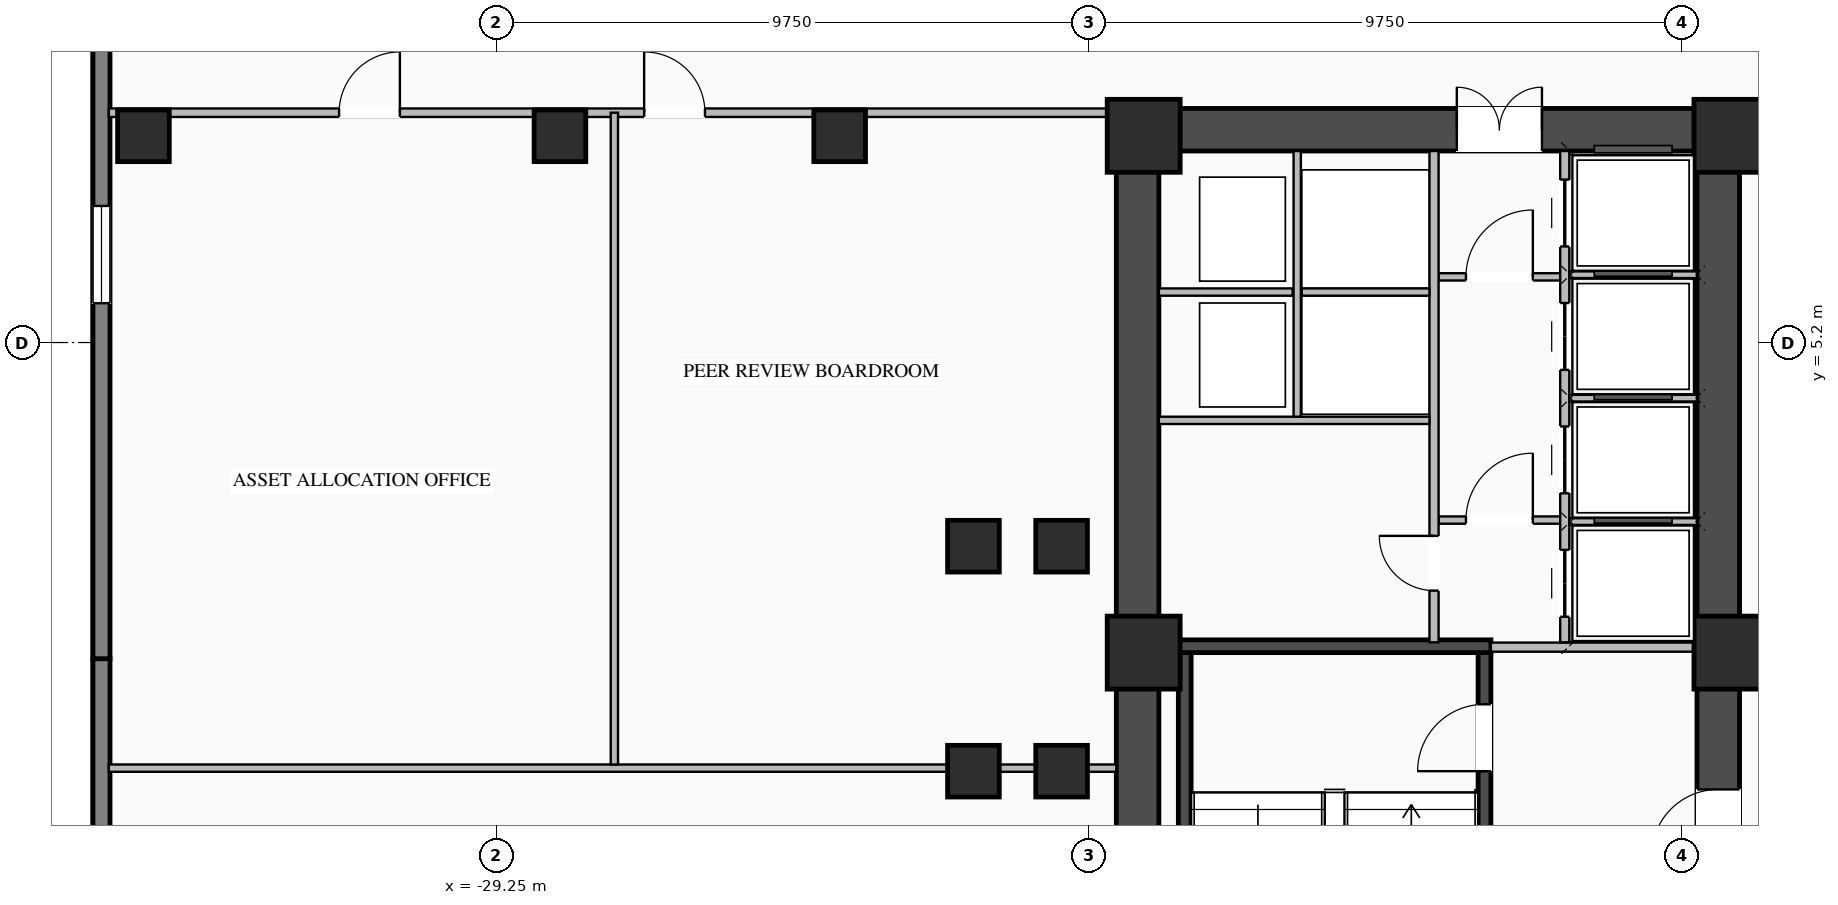
"""IFC4 building model, lengths in metres.
Left out: names, types, materials, properties, quantities, classifications, styles, units other than length and angle.
Written with IfcOpenShell. Run it as: python <this file> out.ifc"""

import sys

from ifc_helpers import new_model, si_unit, direction, frame, frame_2d, origin, origin_2d, place, context, subcontext, project, spatial, rectangle, i_section, extrude, element, fill, save


model = new_model("IFC4")
c1 = context("Model", 3, precision=1e-05, world=origin(), true_north=direction((0.0, 1.0)))
c2 = subcontext(c1, "Body", "Model", "MODEL_VIEW")
j1 = project(units=[si_unit("LENGTHUNIT", "METRE"), si_unit("PLANEANGLEUNIT", "RADIAN")], contexts=[c1])
p1 = place(None, origin())
s1 = spatial("IfcSite", under=j1, at=p1, CompositionType="ELEMENT")
p2 = place(p1, origin())
s2 = spatial("IfcBuilding", under=s1, at=p2, CompositionType="ELEMENT")
p3 = place(p2, frame((0.0, 0.0, 51.9)))
s3 = spatial("IfcBuildingStorey", under=s2, at=p3, CompositionType="ELEMENT", Elevation=51.9)
p4 = place(p3, frame((-19.05, 8.7, 0.0), z_axis=(0.0, 0.0, 1.0), x_axis=(1.0, 0.0, 0.0)))
e1 = element("IfcWall", 1, at=p4, inside=s3, PredefinedType="SHEAR", context=c2, shape_type="SweptSolid", body=[
    extrude(rectangle(XDim=10.25, YDim=0.7, at=frame_2d((5.125, 0.0))), origin(), (0.0, 0.0, 1.0), 3.27),
])
p5 = place(p4, frame((5.6, 0.0, 0.0)))
e2 = element("IfcOpeningElement", 2, at=p5, cuts=e1, PredefinedType="OPENING", context=c2, shape_type="SweptSolid", body=[
    extrude(rectangle(XDim=1.4, YDim=2.05, at=frame_2d((0.7, 1.025))), frame((0.0, 0.36, 0.0), z_axis=(0.0, -1.0, 0.0), x_axis=(1.0, 0.0, 0.0)), (0.0, 0.0, 1.0), 0.72),
])
p6 = place(p3, frame((-18.7, -8.35, 0.0), z_axis=(0.0, 0.0, 1.0), x_axis=(0.0, 1.0, 0.0)))
e3 = element("IfcWall", 3, at=p6, inside=s3, PredefinedType="SHEAR", context=c2, shape_type="SweptSolid", body=[
    extrude(rectangle(XDim=16.7, YDim=0.7, at=frame_2d((8.35, 0.0))), origin(), (0.0, 0.0, 1.0), 3.27),
])
p7 = place(p3, frame((-9.15, -8.35, 0.0), z_axis=(0.0, 0.0, 1.0), x_axis=(0.0, 1.0, 0.0)))
e4 = element("IfcWall", 4, at=p7, inside=s3, PredefinedType="SHEAR", context=c2, shape_type="SweptSolid", body=[
    extrude(rectangle(XDim=16.7, YDim=0.7, at=frame_2d((8.35, 0.0))), origin(), (0.0, 0.0, 1.0), 3.27),
])
p8 = place(p7, frame((5.1, 0.0, 0.0)))
e5 = element("IfcOpeningElement", 5, at=p8, cuts=e4, PredefinedType="OPENING", context=c2, shape_type="SweptSolid", body=[
    extrude(rectangle(XDim=1.1, YDim=2.08, at=frame_2d((0.55, 1.04))), frame((0.0, 0.36, 0.0), z_axis=(0.0, -1.0, 0.0), x_axis=(1.0, 0.0, 0.0)), (0.0, 0.0, 1.0), 0.72),
])
p9 = place(p3, frame((-12.995, -8.1, 0.0), z_axis=(0.0, 0.0, 1.0), x_axis=(0.0, 1.0, 0.0)))
e6 = element("IfcWall", 6, at=p9, inside=s3, PredefinedType="SHEAR", context=c2, shape_type="SweptSolid", body=[
    extrude(rectangle(XDim=8.2, YDim=0.21, at=frame_2d((4.1, 0.0))), origin(), (0.0, 0.0, 1.0), 3.27),
])
p10 = place(p9, frame((6.25, 0.0, 0.0)))
e7 = element("IfcOpeningElement", 7, at=p10, cuts=e6, PredefinedType="OPENING", context=c2, shape_type="SweptSolid", body=[
    extrude(rectangle(XDim=1.1, YDim=2.15, at=frame_2d((0.55, 1.075))), frame((0.0, 0.115, 0.0), z_axis=(0.0, -1.0, 0.0), x_axis=(1.0, 0.0, 0.0)), (0.0, 0.0, 1.0), 0.23),
])
p11 = place(p3, frame((-17.925, -8.1, 0.0), z_axis=(0.0, 0.0, 1.0), x_axis=(0.0, 1.0, 0.0)))
e8 = element("IfcWall", 8, at=p11, inside=s3, PredefinedType="SHEAR", context=c2, shape_type="SweptSolid", body=[
    extrude(rectangle(XDim=8.2, YDim=0.21, at=frame_2d((4.1, 0.0))), origin(), (0.0, 0.0, 1.0), 3.27),
])
p12 = place(p3, frame((-12.89, 0.205, 0.0), z_axis=(0.0, 0.0, 1.0), x_axis=(-1.0, 0.0, 0.0)))
e9 = element("IfcWall", 9, at=p12, inside=s3, PredefinedType="SHEAR", context=c2, shape_type="SweptSolid", body=[
    extrude(rectangle(XDim=5.14, YDim=0.21, at=frame_2d((2.57, 0.0))), origin(), (0.0, 0.0, 1.0), 3.27),
])
for number, where, z_axis, x_axis in (
    (10, (-8.95, 0.1, 0.0), (0.0, 0.0, 1.0), (1.0, 0.0, 0.0)),
    (11, (-8.95, 8.6, 0.0), (0.0, 0.0, 1.0), (1.0, 0.0, 0.0)),
    (12, (-18.6, 0.1, 0.0), (0.0, 0.0, 1.0), (1.0, 0.0, 0.0)),
    (13, (-18.6, 8.6, 0.0), (0.0, 0.0, 1.0), (1.0, 0.0, 0.0)),
):
    element("IfcColumn", number, at=place(p3, frame(where, z_axis=z_axis, x_axis=x_axis)), inside=s3, PredefinedType="COLUMN", context=c2, shape_type="SweptSolid", body=[
        extrude(rectangle(XDim=1.2, YDim=1.2, at=origin_2d()), origin(), (0.0, 0.0, 1.0), 3.45),
    ])
for number, where, z_axis, x_axis in (
    (14, (-21.4, -1.85, 0.0), (0.0, 0.0, 1.0), (1.0, 0.0, 0.0)),
    (15, (-21.4, 1.85, 0.0), (0.0, 0.0, 1.0), (1.0, 0.0, 0.0)),
    (16, (-19.95, -1.85, 0.0), (0.0, 0.0, 1.0), (1.0, 0.0, 0.0)),
    (17, (-19.95, 1.85, 0.0), (0.0, 0.0, 1.0), (1.0, 0.0, 0.0)),
    (18, (-23.6, 8.6, 0.0), (0.0, 0.0, 1.0), (1.0, 0.0, 0.0)),
    (19, (-28.2, 8.6, 0.0), (0.0, 0.0, 1.0), (1.0, 0.0, 0.0)),
    (20, (-35.05, 8.6, 0.0), (0.0, 0.0, 1.0), (1.0, 0.0, 0.0)),
):
    element("IfcColumn", number, at=place(p3, frame(where, z_axis=z_axis, x_axis=x_axis)), inside=s3, PredefinedType="COLUMN", context=c2, shape_type="SweptSolid", body=[
        extrude(i_section(OverallWidth=0.85, OverallDepth=0.85, WebThickness=0.032, FlangeThickness=0.048, at=origin_2d()), origin(), (0.0, 0.0, 1.0), 3.45),
    ])
p13 = place(p3, frame((-35.74, -19.94, 0.0), z_axis=(0.0, 0.0, 1.0), x_axis=(0.0, 1.0, 0.0)))
e21 = element("IfcWall", 21, at=p13, inside=s3, PredefinedType="STANDARD", context=c2, shape_type="SweptSolid", body=[
    extrude(rectangle(XDim=19.94, YDim=0.28, at=frame_2d((9.97, 0.0))), origin(), (0.0, 0.0, 1.0), 3.25),
])
p14 = place(p13, frame((6.397, 0.0, 0.76)))
e22 = element("IfcOpeningElement", 22, at=p14, cuts=e21, PredefinedType="OPENING", context=c2, shape_type="SweptSolid", body=[
    extrude(rectangle(XDim=1.6, YDim=1.95, at=frame_2d((0.8, 0.975))), frame((0.0, 0.15, 0.0), z_axis=(0.0, -1.0, 0.0), x_axis=(1.0, 0.0, 0.0)), (0.0, 0.0, 1.0), 0.3),
])
p15 = place(p13, frame((12.493, 0.0, 0.76)))
e23 = element("IfcOpeningElement", 23, at=p15, cuts=e21, PredefinedType="OPENING", context=c2, shape_type="SweptSolid", body=[
    extrude(rectangle(XDim=1.6, YDim=1.95, at=frame_2d((0.8, 0.975))), frame((0.0, 0.15, 0.0), z_axis=(0.0, -1.0, 0.0), x_axis=(1.0, 0.0, 0.0)), (0.0, 0.0, 1.0), 0.3),
])
p16 = place(p3, frame((-35.74, 0.0, 0.0), z_axis=(0.0, 0.0, 1.0), x_axis=(0.0, 1.0, 0.0)))
e24 = element("IfcWall", 24, at=p16, inside=s3, PredefinedType="STANDARD", context=c2, shape_type="SweptSolid", body=[
    extrude(rectangle(XDim=19.94, YDim=0.28, at=frame_2d((9.97, 0.0))), origin(), (0.0, 0.0, 1.0), 3.25),
])
p17 = place(p16, frame((5.847, 0.0, 0.76)))
e25 = element("IfcOpeningElement", 25, at=p17, cuts=e24, PredefinedType="OPENING", context=c2, shape_type="SweptSolid", body=[
    extrude(rectangle(XDim=1.6, YDim=1.95, at=frame_2d((0.8, 0.975))), frame((0.0, 0.15, 0.0), z_axis=(0.0, -1.0, 0.0), x_axis=(1.0, 0.0, 0.0)), (0.0, 0.0, 1.0), 0.3),
])
p18 = place(p16, frame((11.943, 0.0, 0.76)))
e26 = element("IfcOpeningElement", 26, at=p18, cuts=e24, PredefinedType="OPENING", context=c2, shape_type="SweptSolid", body=[
    extrude(rectangle(XDim=1.6, YDim=1.95, at=frame_2d((0.8, 0.975))), frame((0.0, 0.15, 0.0), z_axis=(0.0, -1.0, 0.0), x_axis=(1.0, 0.0, 0.0)), (0.0, 0.0, 1.0), 0.3),
])
p19 = place(p3, frame((-12.89, 0.19, 0.0), z_axis=(0.0, 0.0, 1.0), x_axis=(1.0, 0.0, 0.0)))
e27 = element("IfcWall", 27, at=p19, inside=s3, PredefinedType="STANDARD", context=c2, shape_type="SweptSolid", body=[
    extrude(rectangle(XDim=3.39, YDim=0.15, at=frame_2d((1.695, 0.0))), origin(), (0.0, 0.0, 1.0), 2.645),
])
p20 = place(p3, frame((-13.75, 2.28, 0.0), z_axis=(0.0, 0.0, 1.0), x_axis=(1.0, 0.0, 0.0)))
e28 = element("IfcWall", 28, at=p20, inside=s3, PredefinedType="STANDARD", context=c2, shape_type="SweptSolid", body=[
    extrude(rectangle(XDim=2.0, YDim=0.12, at=frame_2d((1.0, 0.0))), origin(), (0.0, 0.0, 1.0), 3.25),
])
p21 = place(p20, frame((0.45, 0.0, 0.0)))
e29 = element("IfcOpeningElement", 29, at=p21, cuts=e28, PredefinedType="OPENING", context=c2, shape_type="SweptSolid", body=[
    extrude(rectangle(XDim=1.1, YDim=2.1, at=frame_2d((0.55, 1.05))), frame((0.0, 0.07, 0.0), z_axis=(0.0, -1.0, 0.0), x_axis=(1.0, 0.0, 0.0)), (0.0, 0.0, 1.0), 0.14),
])
p22 = place(p3, frame((-13.75, 6.28, 0.0), z_axis=(0.0, 0.0, 1.0), x_axis=(1.0, 0.0, 0.0)))
e30 = element("IfcWall", 30, at=p22, inside=s3, PredefinedType="STANDARD", context=c2, shape_type="SweptSolid", body=[
    extrude(rectangle(XDim=2.0, YDim=0.12, at=frame_2d((1.0, 0.0))), origin(), (0.0, 0.0, 1.0), 3.25),
])
p23 = place(p22, frame((0.45, 0.0, 0.0)))
e31 = element("IfcOpeningElement", 31, at=p23, cuts=e30, PredefinedType="OPENING", context=c2, shape_type="SweptSolid", body=[
    extrude(rectangle(XDim=1.1, YDim=2.1, at=frame_2d((0.55, 1.05))), frame((0.0, 0.07, 0.0), z_axis=(0.0, -1.0, 0.0), x_axis=(1.0, 0.0, 0.0)), (0.0, 0.0, 1.0), 0.14),
])
p24 = place(p3, frame((-11.675, 0.27, 0.0), z_axis=(0.0, 0.0, 1.0), x_axis=(0.0, 1.0, 0.0)))
e32 = element("IfcWall", 32, at=p24, inside=s3, PredefinedType="STANDARD", context=c2, shape_type="SweptSolid", body=[
    extrude(rectangle(XDim=8.08, YDim=0.15, at=frame_2d((4.04, 0.0))), origin(), (0.0, 0.0, 1.0), 3.25),
])
p25 = place(p24, frame((0.42, 0.0, 0.0)))
e33 = element("IfcOpeningElement", 33, at=p25, cuts=e32, PredefinedType="OPENING", context=c2, shape_type="SweptSolid", body=[
    extrude(rectangle(XDim=1.1, YDim=2.1, at=frame_2d((0.55, 1.05))), frame((0.0, 0.085, 0.0), z_axis=(0.0, -1.0, 0.0), x_axis=(1.0, 0.0, 0.0)), (0.0, 0.0, 1.0), 0.17),
])
p26 = place(p24, frame((2.45, 0.0, 0.0)))
e34 = element("IfcOpeningElement", 34, at=p26, cuts=e32, PredefinedType="OPENING", context=c2, shape_type="SweptSolid", body=[
    extrude(rectangle(XDim=1.1, YDim=2.1, at=frame_2d((0.55, 1.05))), frame((0.0, 0.085, 0.0), z_axis=(0.0, -1.0, 0.0), x_axis=(1.0, 0.0, 0.0)), (0.0, 0.0, 1.0), 0.17),
])
p27 = place(p24, frame((4.48, 0.0, 0.0)))
e35 = element("IfcOpeningElement", 35, at=p27, cuts=e32, PredefinedType="OPENING", context=c2, shape_type="SweptSolid", body=[
    extrude(rectangle(XDim=1.1, YDim=2.1, at=frame_2d((0.55, 1.05))), frame((0.0, 0.085, 0.0), z_axis=(0.0, -1.0, 0.0), x_axis=(1.0, 0.0, 0.0)), (0.0, 0.0, 1.0), 0.17),
])
p28 = place(p24, frame((6.51, 0.0, 0.0)))
e36 = element("IfcOpeningElement", 36, at=p28, cuts=e32, PredefinedType="OPENING", context=c2, shape_type="SweptSolid", body=[
    extrude(rectangle(XDim=1.1, YDim=2.1, at=frame_2d((0.55, 1.05))), frame((0.0, 0.085, 0.0), z_axis=(0.0, -1.0, 0.0), x_axis=(1.0, 0.0, 0.0)), (0.0, 0.0, 1.0), 0.17),
])
for number, where, z_axis, x_axis in (
    (37, (-11.6, 2.255, 0.0), (0.0, 0.0, 1.0), (1.0, 0.0, 0.0)),
    (38, (-11.6, 4.285, 0.0), (0.0, 0.0, 1.0), (1.0, 0.0, 0.0)),
    (39, (-11.6, 6.315, 0.0), (0.0, 0.0, 1.0), (1.0, 0.0, 0.0)),
):
    element("IfcWall", number, at=place(p3, frame(where, z_axis=z_axis, x_axis=x_axis)), inside=s3, PredefinedType="STANDARD", context=c2, shape_type="SweptSolid", body=[
        extrude(rectangle(XDim=2.1, YDim=0.11, at=frame_2d((1.05, 0.0))), origin(), (0.0, 0.0, 1.0), 3.25),
    ])
p29 = place(p3, frame((-13.825, 0.27, 0.0), z_axis=(0.0, 0.0, 1.0), x_axis=(0.0, 1.0, 0.0)))
e40 = element("IfcWall", 40, at=p29, inside=s3, PredefinedType="STANDARD", context=c2, shape_type="SweptSolid", body=[
    extrude(rectangle(XDim=8.08, YDim=0.15, at=frame_2d((4.04, 0.0))), origin(), (0.0, 0.0, 1.0), 3.25),
])
p30 = place(p29, frame((0.85, 0.0, 0.0)))
e41 = element("IfcOpeningElement", 41, at=p30, cuts=e40, PredefinedType="OPENING", context=c2, shape_type="SweptSolid", body=[
    extrude(rectangle(XDim=0.9, YDim=2.05, at=frame_2d((0.45, 1.025))), frame((0.0, 0.085, 0.0), z_axis=(0.0, -1.0, 0.0), x_axis=(1.0, 0.0, 0.0)), (0.0, 0.0, 1.0), 0.17),
])
p31 = place(p3, frame((-18.35, 3.92, 0.0), z_axis=(0.0, 0.0, 1.0), x_axis=(1.0, 0.0, 0.0)))
e42 = element("IfcWall", 42, at=p31, inside=s3, PredefinedType="STANDARD", context=c2, shape_type="SweptSolid", body=[
    extrude(rectangle(XDim=4.45, YDim=0.12, at=frame_2d((2.225, 0.0))), origin(), (0.0, 0.0, 1.0), 3.25),
])
p32 = place(p3, frame((-18.35, 6.03, 0.0), z_axis=(0.0, 0.0, 1.0), x_axis=(1.0, 0.0, 0.0)))
e43 = element("IfcWall", 43, at=p32, inside=s3, PredefinedType="STANDARD", context=c2, shape_type="SweptSolid", body=[
    extrude(rectangle(XDim=2.2, YDim=0.12, at=frame_2d((1.1, 0.0))), origin(), (0.0, 0.0, 1.0), 3.25),
])
p33 = place(p3, frame((-16.075, 3.98, 0.0), z_axis=(0.0, 0.0, 1.0), x_axis=(0.0, 1.0, 0.0)))
e44 = element("IfcWall", 44, at=p33, inside=s3, PredefinedType="STANDARD", context=c2, shape_type="SweptSolid", body=[
    extrude(rectangle(XDim=4.37, YDim=0.12, at=frame_2d((2.185, 0.0))), origin(), (0.0, 0.0, 1.0), 3.25),
])
p34 = place(p3, frame((-16.0, 6.03, 0.0), z_axis=(0.0, 0.0, 1.0), x_axis=(1.0, 0.0, 0.0)))
e45 = element("IfcWall", 45, at=p34, inside=s3, PredefinedType="STANDARD", context=c2, shape_type="SweptSolid", body=[
    extrude(rectangle(XDim=2.1, YDim=0.12, at=frame_2d((1.05, 0.0))), origin(), (0.0, 0.0, 1.0), 3.25),
])
p35 = place(p3, frame((-35.62, 8.98, 0.0), z_axis=(0.0, 0.0, 1.0), x_axis=(1.0, 0.0, 0.0)))
e46 = element("IfcWall", 46, at=p35, inside=s3, PredefinedType="STANDARD", context=c2, shape_type="SweptSolid", body=[
    extrude(rectangle(XDim=16.57, YDim=0.14, at=frame_2d((8.285, 0.0))), origin(), (0.0, 0.0, 1.0), 3.25),
])
p36 = place(p35, frame((3.788, 0.0, 0.0)))
e47 = element("IfcOpeningElement", 47, at=p36, cuts=e46, PredefinedType="OPENING", context=c2, shape_type="SweptSolid", body=[
    extrude(rectangle(XDim=1.0, YDim=2.08, at=frame_2d((0.5, 1.04))), frame((0.0, 0.08, 0.0), z_axis=(0.0, -1.0, 0.0), x_axis=(1.0, 0.0, 0.0)), (0.0, 0.0, 1.0), 0.16),
])
p37 = place(p35, frame((8.805, 0.0, 0.0)))
e48 = element("IfcOpeningElement", 48, at=p37, cuts=e46, PredefinedType="OPENING", context=c2, shape_type="SweptSolid", body=[
    extrude(rectangle(XDim=1.0, YDim=2.08, at=frame_2d((0.5, 1.04))), frame((0.0, 0.08, 0.0), z_axis=(0.0, -1.0, 0.0), x_axis=(1.0, 0.0, 0.0)), (0.0, 0.0, 1.0), 0.16),
])
p38 = place(p3, frame((-35.62, -1.8, 0.0), z_axis=(0.0, 0.0, 1.0), x_axis=(1.0, 0.0, 0.0)))
e49 = element("IfcWall", 49, at=p38, inside=s3, PredefinedType="STANDARD", context=c2, shape_type="SweptSolid", body=[
    extrude(rectangle(XDim=16.57, YDim=0.12, at=frame_2d((8.285, 0.0))), origin(), (0.0, 0.0, 1.0), 3.25),
])
p39 = place(p3, frame((-27.305, -1.74, 0.0), z_axis=(0.0, 0.0, 1.0), x_axis=(0.0, 1.0, 0.0)))
e50 = element("IfcWall", 50, at=p39, inside=s3, PredefinedType="STANDARD", context=c2, shape_type="SweptSolid", body=[
    extrude(rectangle(XDim=10.72, YDim=0.12, at=frame_2d((5.36, 0.0))), origin(), (0.0, 0.0, 1.0), 3.25),
])
p40 = place(p17, origin())
e51 = element("IfcWindow", 51, at=p40, inside=s3, PartitioningType="SINGLE_PANEL", PredefinedType="WINDOW", context=c2, shape_type="SweptSolid", body=[
    extrude(rectangle(XDim=1.6, YDim=1.95, at=frame_2d((0.8, 0.975))), frame((0.0, 0.03, 0.0), z_axis=(0.0, -1.0, 0.0), x_axis=(1.0, 0.0, 0.0)), (0.0, 0.0, 1.0), 0.06),
])
fill(e25, e51)
p41 = place(p10, origin())
e52 = element("IfcDoor", 52, at=p41, inside=s3, OperationType="SINGLE_SWING_LEFT", PredefinedType="DOOR", context=c2, shape_type="SweptSolid", body=[
    extrude(rectangle(XDim=1.1, YDim=2.15, at=frame_2d((0.55, 1.075))), frame((0.0, 0.025, 0.0), z_axis=(0.0, -1.0, 0.0), x_axis=(1.0, 0.0, 0.0)), (0.0, 0.0, 1.0), 0.05),
])
fill(e7, e52)
p42 = place(p8, origin())
e53 = element("IfcDoor", 53, at=p42, inside=s3, OperationType="SINGLE_SWING_LEFT", PredefinedType="DOOR", context=c2, shape_type="SweptSolid", body=[
    extrude(rectangle(XDim=1.1, YDim=2.08, at=frame_2d((0.55, 1.04))), frame((0.0, 0.305, 0.0), z_axis=(0.0, -1.0, 0.0), x_axis=(1.0, 0.0, 0.0)), (0.0, 0.0, 1.0), 0.05),
])
fill(e5, e53)
p43 = place(p21, origin())
e54 = element("IfcDoor", 54, at=p43, inside=s3, OperationType="SINGLE_SWING_RIGHT", PredefinedType="DOOR", context=c2, shape_type="SweptSolid", body=[
    extrude(rectangle(XDim=1.1, YDim=2.1, at=frame_2d((0.55, 1.05))), frame((0.0, 0.025, 0.0), z_axis=(0.0, -1.0, 0.0), x_axis=(1.0, 0.0, 0.0)), (0.0, 0.0, 1.0), 0.05),
])
fill(e29, e54)
p44 = place(p23, origin())
e55 = element("IfcDoor", 55, at=p44, inside=s3, OperationType="SINGLE_SWING_RIGHT", PredefinedType="DOOR", context=c2, shape_type="SweptSolid", body=[
    extrude(rectangle(XDim=1.1, YDim=2.1, at=frame_2d((0.55, 1.05))), frame((0.0, 0.025, 0.0), z_axis=(0.0, -1.0, 0.0), x_axis=(1.0, 0.0, 0.0)), (0.0, 0.0, 1.0), 0.05),
])
fill(e31, e55)
p45 = place(p5, origin())
e56 = element("IfcDoor", 56, at=p45, inside=s3, OperationType="DOUBLE_DOOR_SINGLE_SWING", PredefinedType="DOOR", context=c2, shape_type="SweptSolid", body=[
    extrude(rectangle(XDim=1.4, YDim=2.05, at=frame_2d((0.7, 1.025))), frame((0.0, 0.295, 0.0), z_axis=(0.0, -1.0, 0.0), x_axis=(1.0, 0.0, 0.0)), (0.0, 0.0, 1.0), 0.05),
])
fill(e2, e56)
p46 = place(p25, origin())
e57 = element("IfcDoor", 57, at=p46, inside=s3, OperationType="DOUBLE_DOOR_SLIDING", PredefinedType="DOOR", context=c2, shape_type="SweptSolid", body=[
    extrude(rectangle(XDim=1.1, YDim=2.1, at=frame_2d((0.55, 1.05))), frame((0.0, 0.025, 0.0), z_axis=(0.0, -1.0, 0.0), x_axis=(1.0, 0.0, 0.0)), (0.0, 0.0, 1.0), 0.05),
])
fill(e33, e57)
p47 = place(p26, origin())
e58 = element("IfcDoor", 58, at=p47, inside=s3, OperationType="DOUBLE_DOOR_SLIDING", PredefinedType="DOOR", context=c2, shape_type="SweptSolid", body=[
    extrude(rectangle(XDim=1.1, YDim=2.1, at=frame_2d((0.55, 1.05))), frame((0.0, 0.025, 0.0), z_axis=(0.0, -1.0, 0.0), x_axis=(1.0, 0.0, 0.0)), (0.0, 0.0, 1.0), 0.05),
])
fill(e34, e58)
p48 = place(p27, origin())
e59 = element("IfcDoor", 59, at=p48, inside=s3, OperationType="DOUBLE_DOOR_SLIDING", PredefinedType="DOOR", context=c2, shape_type="SweptSolid", body=[
    extrude(rectangle(XDim=1.1, YDim=2.1, at=frame_2d((0.55, 1.05))), frame((0.0, 0.025, 0.0), z_axis=(0.0, -1.0, 0.0), x_axis=(1.0, 0.0, 0.0)), (0.0, 0.0, 1.0), 0.05),
])
fill(e35, e59)
p49 = place(p28, origin())
e60 = element("IfcDoor", 60, at=p49, inside=s3, OperationType="DOUBLE_DOOR_SLIDING", PredefinedType="DOOR", context=c2, shape_type="SweptSolid", body=[
    extrude(rectangle(XDim=1.1, YDim=2.1, at=frame_2d((0.55, 1.05))), frame((0.0, 0.025, 0.0), z_axis=(0.0, -1.0, 0.0), x_axis=(1.0, 0.0, 0.0)), (0.0, 0.0, 1.0), 0.05),
])
fill(e36, e60)
p50 = place(p30, origin())
e61 = element("IfcDoor", 61, at=p50, inside=s3, OperationType="SINGLE_SWING_RIGHT", PredefinedType="DOOR", context=c2, shape_type="SweptSolid", body=[
    extrude(rectangle(XDim=0.9, YDim=2.05, at=frame_2d((0.45, 1.025))), frame((0.0, 0.025, 0.0), z_axis=(0.0, -1.0, 0.0), x_axis=(1.0, 0.0, 0.0)), (0.0, 0.0, 1.0), 0.05),
])
fill(e41, e61)
p51 = place(p36, origin())
e62 = element("IfcDoor", 62, at=p51, inside=s3, OperationType="SINGLE_SWING_RIGHT", PredefinedType="DOOR", context=c2, shape_type="SweptSolid", body=[
    extrude(rectangle(XDim=1.0, YDim=2.08, at=frame_2d((0.5, 1.04))), frame((0.0, 0.025, 0.0), z_axis=(0.0, -1.0, 0.0), x_axis=(1.0, 0.0, 0.0)), (0.0, 0.0, 1.0), 0.05),
])
fill(e47, e62)
p52 = place(p37, origin())
e63 = element("IfcDoor", 63, at=p52, inside=s3, OperationType="SINGLE_SWING_LEFT", PredefinedType="DOOR", context=c2, shape_type="SweptSolid", body=[
    extrude(rectangle(XDim=1.0, YDim=2.08, at=frame_2d((0.5, 1.04))), frame((0.0, 0.025, 0.0), z_axis=(0.0, -1.0, 0.0), x_axis=(1.0, 0.0, 0.0)), (0.0, 0.0, 1.0), 0.05),
])
fill(e48, e63)
save(model, sys.argv[1])
